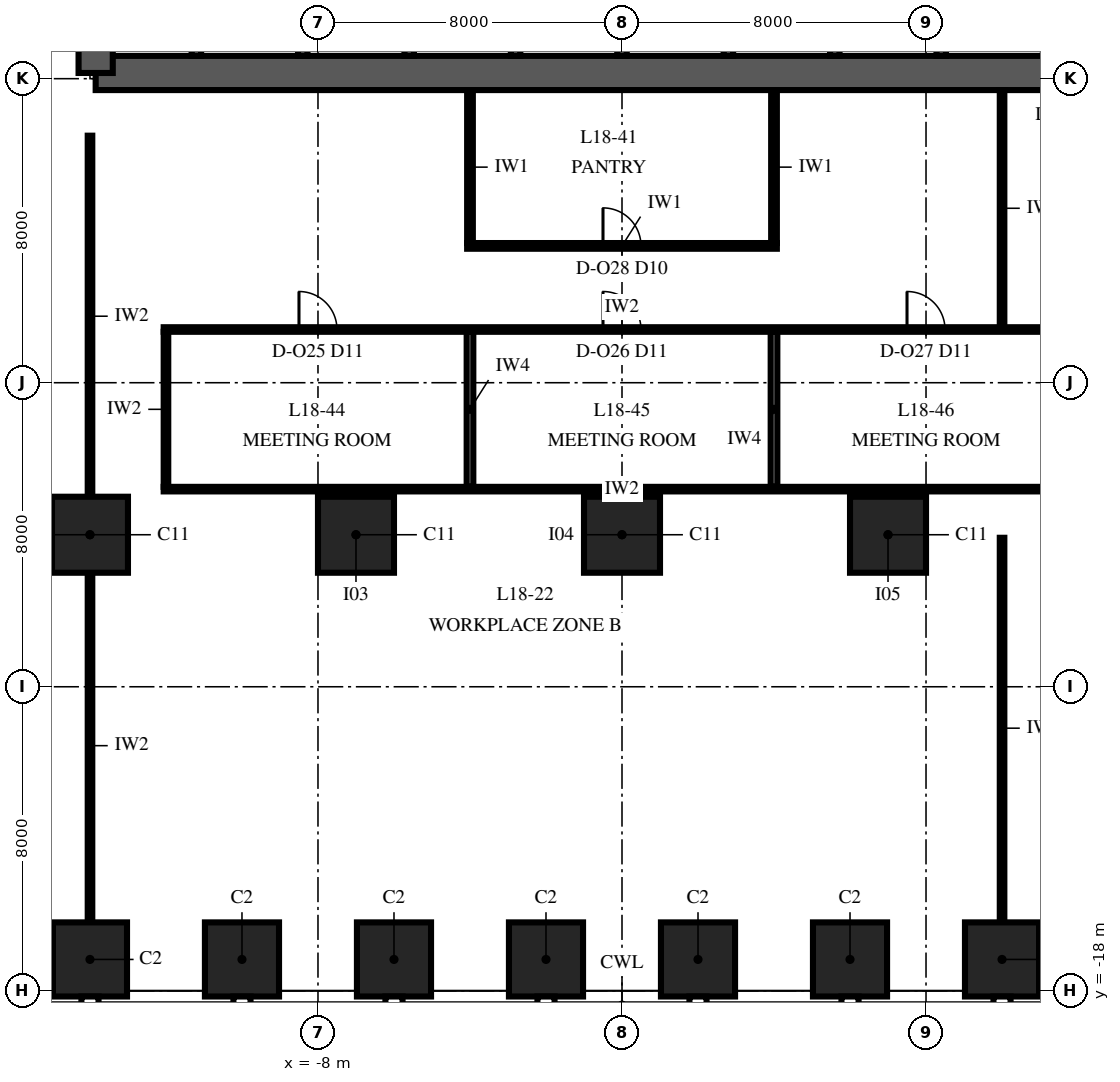
"""IFC4 building model, lengths in metres.
Left out: names, types, materials, properties, quantities, classifications, styles, units other than length and angle.
Written with IfcOpenShell. Run it as: python <this file> out.ifc"""

import sys

from ifc_helpers import new_model, si_unit, direction, frame, frame_2d, origin, origin_2d, place, context, subcontext, project, spatial, polyline, rectangle, outline, extrude, element, fill, save


model = new_model("IFC4")
c1 = context("Model", 3, precision=1e-05, world=origin(), true_north=direction((0.0, 1.0)))
c2 = subcontext(c1, "Body", "Model", "MODEL_VIEW")
j1 = project(units=[si_unit("LENGTHUNIT", "METRE"), si_unit("PLANEANGLEUNIT", "RADIAN")], contexts=[c1])
p1 = place(None, origin())
s1 = spatial("IfcSite", under=j1, at=p1, CompositionType="ELEMENT")
p2 = place(p1, origin())
s2 = spatial("IfcBuilding", under=s1, at=p2, CompositionType="ELEMENT")
p3 = place(p2, frame((0.0, 0.0, 84.0)))
s3 = spatial("IfcBuildingStorey", under=s2, at=p3, CompositionType="ELEMENT", Elevation=84.0)
for number, where, z_axis, x_axis in (
    (1, (-14.0, -17.175, 0.0), (0.0, 0.0, 1.0), (1.0, 0.0, 0.0)),
    (2, (-10.0, -17.175, 0.0), (0.0, 0.0, 1.0), (1.0, 0.0, 0.0)),
    (3, (-6.0, -17.175, 0.0), (0.0, 0.0, 1.0), (1.0, 0.0, 0.0)),
    (4, (-2.0, -17.175, 0.0), (0.0, 0.0, 1.0), (1.0, 0.0, 0.0)),
    (5, (2.0, -17.175, 0.0), (0.0, 0.0, 1.0), (1.0, 0.0, 0.0)),
    (6, (6.0, -17.175, 0.0), (0.0, 0.0, 1.0), (1.0, 0.0, 0.0)),
    (7, (10.0, -17.175, 0.0), (0.0, 0.0, 1.0), (1.0, 0.0, 0.0)),
):
    element("IfcColumn", number, at=place(p3, frame(where, z_axis=z_axis, x_axis=x_axis)), inside=s3, PredefinedType="COLUMN", context=c2, shape_type="SweptSolid", body=[
        extrude(rectangle(XDim=1.95, YDim=1.95, at=origin_2d()), origin(), (0.0, 0.0, 1.0), 4.0),
    ])
for number, where, z_axis, x_axis in (
    (8, (-14.0, -6.0, 0.0), (0.0, 0.0, 1.0), (1.0, 0.0, 0.0)),
    (9, (-7.0, -6.0, 0.0), (0.0, 0.0, 1.0), (1.0, 0.0, 0.0)),
    (10, (0.0, -6.0, 0.0), (0.0, 0.0, 1.0), (1.0, 0.0, 0.0)),
    (11, (7.0, -6.0, 0.0), (0.0, 0.0, 1.0), (1.0, 0.0, 0.0)),
):
    element("IfcColumn", number, at=place(p3, frame(where, z_axis=z_axis, x_axis=x_axis)), inside=s3, PredefinedType="COLUMN", context=c2, shape_type="SweptSolid", body=[
        extrude(rectangle(XDim=2.0, YDim=2.0, at=origin_2d()), origin(), (0.0, 0.0, 1.0), 4.0),
    ])
p4 = place(p3, frame((-13.85, 6.15, 0.0), z_axis=(0.0, 0.0, 1.0), x_axis=(1.0, 0.0, 0.0)))
e12 = element("IfcWall", 12, at=p4, inside=s3, PredefinedType="SHEAR", context=c2, shape_type="SweptSolid", body=[
    extrude(rectangle(XDim=27.7, YDim=0.9, at=frame_2d((13.85, 0.0))), origin(), (0.0, 0.0, 1.0), 4.0),
])
p5 = place(p3, frame((-13.85, 23.85, 0.0), z_axis=(0.0, 0.0, 1.0), x_axis=(0.0, -1.0, 0.0)))
e13 = element("IfcWall", 13, at=p5, inside=s3, PredefinedType="SHEAR", context=c2, shape_type="SweptSolid", body=[
    extrude(outline(polyline([(0.0, -0.45), (17.7, -0.45), (17.7, 0.0), (17.25, 0.0), (17.25, 0.45), (0.45, 0.45), (0.45, 0.0), (0.0, 0.0), (0.0, -0.45)])), origin(), (0.0, 0.0, 1.0), 4.0),
])
p6 = place(p5, frame((11.75, 0.0, 0.0)))
e14 = element("IfcOpeningElement", 14, at=p6, cuts=e13, PredefinedType="OPENING", context=c2, shape_type="SweptSolid", body=[
    extrude(rectangle(XDim=1.8, YDim=2.4, at=frame_2d((0.9, 1.2))), frame((0.0, 0.465, 0.0), z_axis=(0.0, -1.0, 0.0), x_axis=(1.0, 0.0, 0.0)), (0.0, 0.0, 1.0), 0.93),
])
for number, where, z_axis, x_axis in (
    (15, (-11.2, 6.6, 0.0), (0.0, 0.0, 1.0), (0.0, 1.0, 0.0)),
    (16, (-8.4, 6.6, 0.0), (0.0, 0.0, 1.0), (0.0, 1.0, 0.0)),
    (17, (-5.6, 6.6, 0.0), (0.0, 0.0, 1.0), (0.0, 1.0, 0.0)),
    (18, (-2.8, 6.6, 0.0), (0.0, 0.0, 1.0), (0.0, 1.0, 0.0)),
    (19, (0.0, 6.6, 0.0), (0.0, 0.0, 1.0), (0.0, 1.0, 0.0)),
    (20, (2.8, 6.6, 0.0), (0.0, 0.0, 1.0), (0.0, 1.0, 0.0)),
    (21, (5.6, 6.6, 0.0), (0.0, 0.0, 1.0), (0.0, 1.0, 0.0)),
    (22, (8.4, 6.6, 0.0), (0.0, 0.0, 1.0), (0.0, 1.0, 0.0)),
):
    element("IfcWall", number, at=place(p3, frame(where, z_axis=z_axis, x_axis=x_axis)), inside=s3, PredefinedType="SHEAR", context=c2, shape_type="SweptSolid", body=[
        extrude(rectangle(XDim=2.675, YDim=0.25, at=frame_2d((1.337, 0.0))), origin(), (0.0, 0.0, 1.0), 4.0),
    ])
p7 = place(p3, frame((-12.06, -4.8, 0.0), z_axis=(0.0, 0.0, 1.0), x_axis=(1.0, 0.0, 0.0)))
e23 = element("IfcWall", 23, at=p7, inside=s3, PredefinedType="PARTITIONING", context=c2, shape_type="SweptSolid", body=[
    extrude(rectangle(XDim=24.12, YDim=0.12, at=frame_2d((12.06, 0.0))), origin(), (0.0, 0.0, 1.0), 3.25),
])
p8 = place(p3, frame((-12.06, -0.6, 0.0), z_axis=(0.0, 0.0, 1.0), x_axis=(1.0, 0.0, 0.0)))
e24 = element("IfcWall", 24, at=p8, inside=s3, PredefinedType="PARTITIONING", context=c2, shape_type="SweptSolid", body=[
    extrude(rectangle(XDim=24.12, YDim=0.12, at=frame_2d((12.06, 0.0))), origin(), (0.0, 0.0, 1.0), 3.25),
])
p9 = place(p8, frame((3.56, 0.0, 0.0)))
e25 = element("IfcOpeningElement", 25, at=p9, cuts=e24, PredefinedType="OPENING", context=c2, shape_type="SweptSolid", body=[
    extrude(rectangle(XDim=1.0, YDim=2.4, at=frame_2d((0.5, 1.2))), frame((0.0, 0.075, 0.0), z_axis=(0.0, -1.0, 0.0), x_axis=(1.0, 0.0, 0.0)), (0.0, 0.0, 1.0), 0.15),
])
p10 = place(p8, frame((11.56, 0.0, 0.0)))
e26 = element("IfcOpeningElement", 26, at=p10, cuts=e24, PredefinedType="OPENING", context=c2, shape_type="SweptSolid", body=[
    extrude(rectangle(XDim=1.0, YDim=2.4, at=frame_2d((0.5, 1.2))), frame((0.0, 0.075, 0.0), z_axis=(0.0, -1.0, 0.0), x_axis=(1.0, 0.0, 0.0)), (0.0, 0.0, 1.0), 0.15),
])
p11 = place(p8, frame((19.56, 0.0, 0.0)))
e27 = element("IfcOpeningElement", 27, at=p11, cuts=e24, PredefinedType="OPENING", context=c2, shape_type="SweptSolid", body=[
    extrude(rectangle(XDim=1.0, YDim=2.4, at=frame_2d((0.5, 1.2))), frame((0.0, 0.075, 0.0), z_axis=(0.0, -1.0, 0.0), x_axis=(1.0, 0.0, 0.0)), (0.0, 0.0, 1.0), 0.15),
])
p12 = place(p3, frame((-4.075, 1.6, 0.0), z_axis=(0.0, 0.0, 1.0), x_axis=(1.0, 0.0, 0.0)))
e28 = element("IfcWall", 28, at=p12, inside=s3, PredefinedType="PARTITIONING", context=c2, shape_type="SweptSolid", body=[
    extrude(rectangle(XDim=8.15, YDim=0.15, at=frame_2d((4.075, 0.0))), origin(), (0.0, 0.0, 1.0), 3.25),
])
p13 = place(p12, frame((3.575, 0.0, 0.0)))
e29 = element("IfcOpeningElement", 29, at=p13, cuts=e28, PredefinedType="OPENING", context=c2, shape_type="SweptSolid", body=[
    extrude(rectangle(XDim=1.0, YDim=2.3, at=frame_2d((0.5, 1.15))), frame((0.0, 0.09, 0.0), z_axis=(0.0, -1.0, 0.0), x_axis=(1.0, 0.0, 0.0)), (0.0, 0.0, 1.0), 0.18),
])
p14 = place(p3, frame((-12.0, -4.74, 0.0), z_axis=(0.0, 0.0, 1.0), x_axis=(0.0, 1.0, 0.0)))
e30 = element("IfcWall", 30, at=p14, inside=s3, PredefinedType="PARTITIONING", context=c2, shape_type="SweptSolid", body=[
    extrude(rectangle(XDim=4.08, YDim=0.12, at=frame_2d((2.04, 0.0))), origin(), (0.0, 0.0, 1.0), 3.85),
])
p15 = place(p3, frame((-4.0, -4.74, 0.0), z_axis=(0.0, 0.0, 1.0), x_axis=(0.0, 1.0, 0.0)))
e31 = element("IfcWall", 31, at=p15, inside=s3, PredefinedType="PARTITIONING", context=c2, shape_type="SweptSolid", body=[
    extrude(rectangle(XDim=4.08, YDim=0.175, at=frame_2d((2.04, 0.0))), origin(), (0.0, 0.0, 1.0), 3.85),
])
p16 = place(p3, frame((-4.0, 1.675, 0.0), z_axis=(0.0, 0.0, 1.0), x_axis=(0.0, 1.0, 0.0)))
e32 = element("IfcWall", 32, at=p16, inside=s3, PredefinedType="PARTITIONING", context=c2, shape_type="SweptSolid", body=[
    extrude(rectangle(XDim=3.995, YDim=0.15, at=frame_2d((1.998, 0.0))), origin(), (0.0, 0.0, 1.0), 3.85),
])
p17 = place(p3, frame((4.0, -4.74, 0.0), z_axis=(0.0, 0.0, 1.0), x_axis=(0.0, 1.0, 0.0)))
e33 = element("IfcWall", 33, at=p17, inside=s3, PredefinedType="PARTITIONING", context=c2, shape_type="SweptSolid", body=[
    extrude(rectangle(XDim=4.08, YDim=0.175, at=frame_2d((2.04, 0.0))), origin(), (0.0, 0.0, 1.0), 3.85),
])
p18 = place(p3, frame((4.0, 1.675, 0.0), z_axis=(0.0, 0.0, 1.0), x_axis=(0.0, 1.0, 0.0)))
e34 = element("IfcWall", 34, at=p18, inside=s3, PredefinedType="PARTITIONING", context=c2, shape_type="SweptSolid", body=[
    extrude(rectangle(XDim=3.995, YDim=0.15, at=frame_2d((1.998, 0.0))), origin(), (0.0, 0.0, 1.0), 3.85),
])
p19 = place(p3, frame((-13.999, -16.1, 0.0), z_axis=(0.0, 0.0, 1.0), x_axis=(0.0, 1.0, 0.0)))
e35 = element("IfcWall", 35, at=p19, inside=s3, PredefinedType="PARTITIONING", context=c2, shape_type="SweptSolid", body=[
    extrude(rectangle(XDim=9.1, YDim=0.12, at=frame_2d((4.55, 0.0))), origin(), (0.0, 0.0, 1.0), 3.25),
])
p20 = place(p3, frame((-13.999, -5.0, 0.0), z_axis=(0.0, 0.0, 1.0), x_axis=(0.0, 1.0, 0.0)))
e36 = element("IfcWall", 36, at=p20, inside=s3, PredefinedType="PARTITIONING", context=c2, shape_type="SweptSolid", body=[
    extrude(rectangle(XDim=9.5, YDim=0.12, at=frame_2d((4.75, 0.0))), origin(), (0.0, 0.0, 1.0), 3.25),
])
p21 = place(p3, frame((10.001, -16.1, 0.0), z_axis=(0.0, 0.0, 1.0), x_axis=(0.0, 1.0, 0.0)))
e37 = element("IfcWall", 37, at=p21, inside=s3, PredefinedType="PARTITIONING", context=c2, shape_type="SweptSolid", body=[
    extrude(rectangle(XDim=10.02, YDim=0.12, at=frame_2d((5.01, 0.0))), origin(), (0.0, 0.0, 1.0), 2.842),
])
p22 = place(p3, frame((10.001, -0.52, 0.0), z_axis=(0.0, 0.0, 1.0), x_axis=(0.0, 1.0, 0.0)))
e38 = element("IfcWall", 38, at=p22, inside=s3, PredefinedType="PARTITIONING", context=c2, shape_type="SweptSolid", body=[
    extrude(rectangle(XDim=6.22, YDim=0.12, at=frame_2d((3.11, 0.0))), origin(), (0.0, 0.0, 1.0), 3.85),
])
p23 = place(p9, origin())
e39 = element("IfcDoor", 39, at=p23, inside=s3, OperationType="SINGLE_SWING_RIGHT", PredefinedType="DOOR", context=c2, shape_type="SweptSolid", body=[
    extrude(rectangle(XDim=1.0, YDim=2.4, at=frame_2d((0.5, 1.2))), frame((0.0, 0.06, 0.0), z_axis=(0.0, -1.0, 0.0), x_axis=(1.0, 0.0, 0.0)), (0.0, 0.0, 1.0), 0.12),
])
fill(e25, e39)
p24 = place(p10, origin())
e40 = element("IfcDoor", 40, at=p24, inside=s3, OperationType="SINGLE_SWING_RIGHT", PredefinedType="DOOR", context=c2, shape_type="SweptSolid", body=[
    extrude(rectangle(XDim=1.0, YDim=2.4, at=frame_2d((0.5, 1.2))), frame((0.0, 0.06, 0.0), z_axis=(0.0, -1.0, 0.0), x_axis=(1.0, 0.0, 0.0)), (0.0, 0.0, 1.0), 0.12),
])
fill(e26, e40)
p25 = place(p11, origin())
e41 = element("IfcDoor", 41, at=p25, inside=s3, OperationType="SINGLE_SWING_RIGHT", PredefinedType="DOOR", context=c2, shape_type="SweptSolid", body=[
    extrude(rectangle(XDim=1.0, YDim=2.4, at=frame_2d((0.5, 1.2))), frame((0.0, 0.06, 0.0), z_axis=(0.0, -1.0, 0.0), x_axis=(1.0, 0.0, 0.0)), (0.0, 0.0, 1.0), 0.12),
])
fill(e27, e41)
p26 = place(p13, origin())
e42 = element("IfcDoor", 42, at=p26, inside=s3, OperationType="SINGLE_SWING_LEFT", PredefinedType="DOOR", context=c2, shape_type="SweptSolid", body=[
    extrude(rectangle(XDim=1.0, YDim=2.3, at=frame_2d((0.5, 1.15))), frame((0.0, 0.075, 0.0), z_axis=(0.0, -1.0, 0.0), x_axis=(1.0, 0.0, 0.0)), (0.0, 0.0, 1.0), 0.149),
])
fill(e29, e42)
save(model, sys.argv[1])
